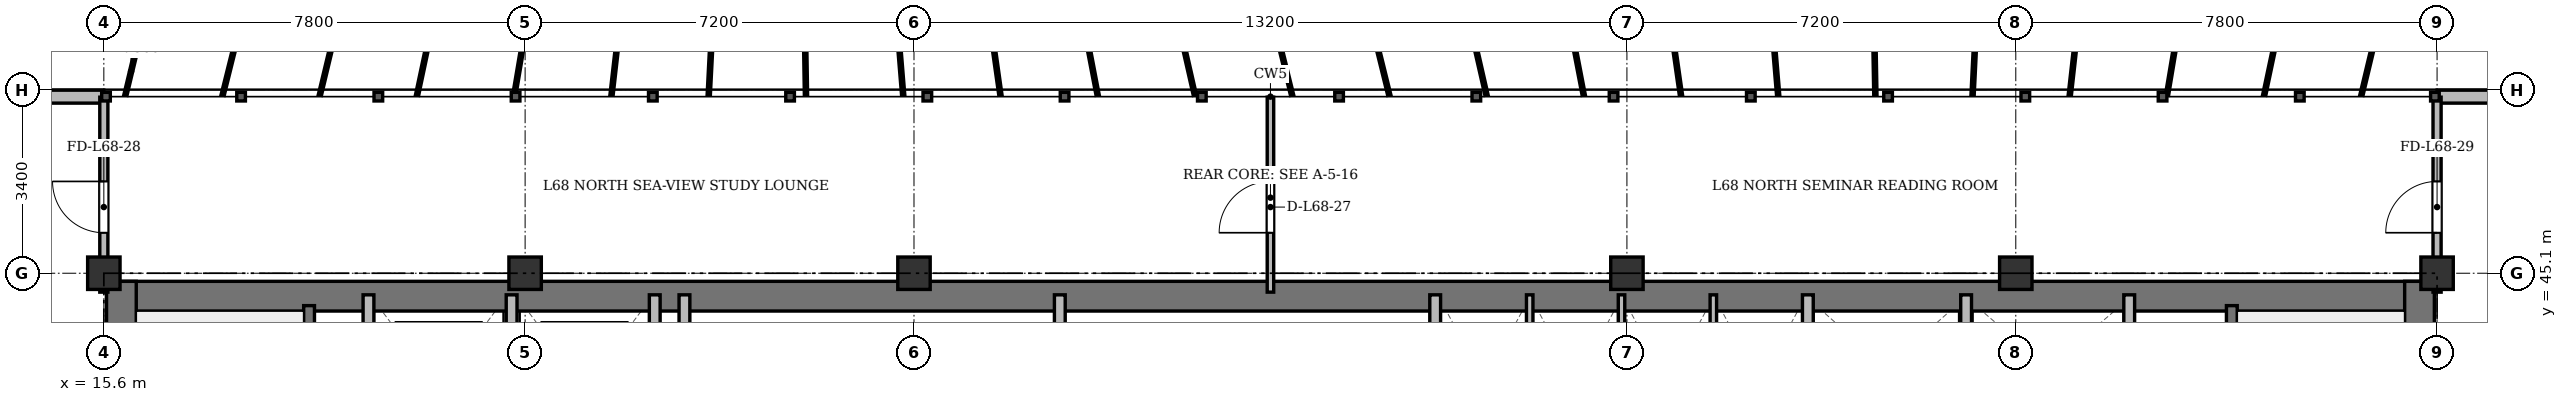
"""IFC4 building model, lengths in metres.
Left out: names, types, materials, properties, quantities, classifications, styles, units other than length and angle.
Written with IfcOpenShell. Run it as: python <this file> out.ifc"""

import sys

from ifc_helpers import new_model, si_unit, direction, frame, frame_2d, origin, origin_2d, place, context, subcontext, project, spatial, rectangle, extrude, source, transform, mapped, element, fill, save


model = new_model("IFC4")
c1 = context("Model", 3, precision=1e-05, world=origin(), true_north=direction((0.0, 1.0)))
c2 = subcontext(c1, "Body", "Model", "MODEL_VIEW")
j1 = project(units=[si_unit("LENGTHUNIT", "METRE"), si_unit("PLANEANGLEUNIT", "RADIAN")], contexts=[c1])
p1 = place(None, origin())
s1 = spatial("IfcSite", under=j1, at=p1, CompositionType="ELEMENT")
p2 = place(p1, origin())
s2 = spatial("IfcBuilding", under=s1, at=p2, CompositionType="ELEMENT")
p3 = place(p2, frame((0.0, 0.0, 263.1)))
s3 = spatial("IfcBuildingStorey", under=s2, at=p3, CompositionType="ELEMENT", Elevation=263.1)
m1 = source(origin(), c2, "Body", "SweptSolid", [
    extrude(rectangle(XDim=0.6, YDim=0.6, at=origin_2d()), origin(), (0.0, 0.0, 1.0), 3.6),
])
for number, where, z_axis, x_axis in (
    (1, (15.6, 45.1, 0.0), (0.0, 0.0, 1.0), (1.0, 0.0, 0.0)),
    (2, (23.4, 45.1, 0.0), (0.0, 0.0, 1.0), (1.0, 0.0, 0.0)),
    (3, (30.6, 45.1, 0.0), (0.0, 0.0, 1.0), (1.0, 0.0, 0.0)),
    (4, (43.8, 45.1, 0.0), (0.0, 0.0, 1.0), (1.0, 0.0, 0.0)),
    (5, (51.0, 45.1, 0.0), (0.0, 0.0, 1.0), (1.0, 0.0, 0.0)),
    (6, (58.8, 45.1, 0.0), (0.0, 0.0, 1.0), (1.0, 0.0, 0.0)),
):
    element("IfcColumn", number, at=place(p3, frame(where, z_axis=z_axis, x_axis=x_axis)), inside=s3, PredefinedType="COLUMN", context=c2, shape_type="MappedRepresentation", body=[
        mapped(m1, transform((0.0, 0.0, 0.0), x_axis=(1.0, 0.0, 0.0), y_axis=(0.0, 1.0, 0.0), z_axis=(0.0, 0.0, 1.0), scale=1.0)),
    ])
p4 = place(p3, frame((11.3, 48.37, 0.0), z_axis=(0.0, 0.0, 1.0), x_axis=(1.0, 0.0, 0.0)))
e7 = element("IfcWall", 7, at=p4, inside=s3, PredefinedType="SOLIDWALL", context=c2, shape_type="SweptSolid", body=[
    extrude(rectangle(XDim=4.3, YDim=0.24, at=frame_2d((2.15, 0.0))), origin(), (0.0, 0.0, 1.0), 3.37),
])
p5 = place(p4, frame((1.734, 0.0, 0.9)))
e8 = element("IfcOpeningElement", 8, at=p5, cuts=e7, PredefinedType="OPENING", context=c2, shape_type="SweptSolid", body=[
    extrude(rectangle(XDim=1.2, YDim=1.65, at=frame_2d((0.6, 0.825))), frame((0.0, 0.13, 0.0), z_axis=(0.0, -1.0, 0.0), x_axis=(1.0, 0.0, 0.0)), (0.0, 0.0, 1.0), 0.26),
])
p6 = place(p3, frame((58.8, 48.37, 0.0), z_axis=(0.0, 0.0, 1.0), x_axis=(1.0, 0.0, 0.0)))
e9 = element("IfcWall", 9, at=p6, inside=s3, PredefinedType="SOLIDWALL", context=c2, shape_type="SweptSolid", body=[
    extrude(rectangle(XDim=4.3, YDim=0.24, at=frame_2d((2.15, 0.0))), origin(), (0.0, 0.0, 1.0), 3.37),
])
p7 = place(p6, frame((1.46, 0.0, 0.9)))
e10 = element("IfcOpeningElement", 10, at=p7, cuts=e9, PredefinedType="OPENING", context=c2, shape_type="SweptSolid", body=[
    extrude(rectangle(XDim=1.2, YDim=1.65, at=frame_2d((0.6, 0.825))), frame((0.0, 0.13, 0.0), z_axis=(0.0, -1.0, 0.0), x_axis=(1.0, 0.0, 0.0)), (0.0, 0.0, 1.0), 0.26),
])
p8 = place(p3, frame((15.65, 44.675, 0.0), z_axis=(0.0, 0.0, 1.0), x_axis=(1.0, 0.0, 0.0)))
e11 = element("IfcWall", 11, at=p8, inside=s3, PredefinedType="SHEAR", context=c2, shape_type="SweptSolid", body=[
    extrude(rectangle(XDim=43.1, YDim=0.55, at=frame_2d((21.55, 0.0))), origin(), (0.0, 0.0, 1.0), 3.37),
])
for number, where, z_axis, x_axis in (
    (12, (15.925, 33.4, 0.0), (0.0, 0.0, 1.0), (0.0, 1.0, 0.0)),
    (13, (58.475, 33.4, 0.0), (0.0, 0.0, 1.0), (0.0, 1.0, 0.0)),
):
    element("IfcWall", number, at=place(p3, frame(where, z_axis=z_axis, x_axis=x_axis)), inside=s3, PredefinedType="SHEAR", context=c2, shape_type="SweptSolid", body=[
        extrude(rectangle(XDim=11.55, YDim=0.55, at=frame_2d((5.775, 0.0))), origin(), (0.0, 0.0, 1.0), 3.37),
    ])
p9 = place(p3, frame((19.4, 33.4, 0.0), z_axis=(0.0, 0.0, 1.0), x_axis=(0.0, 1.0, 0.0)))
e14 = element("IfcWall", 14, at=p9, inside=s3, PredefinedType="SHEAR", context=c2, shape_type="SweptSolid", body=[
    extrude(rectangle(XDim=11.1, YDim=0.2, at=frame_2d((5.55, 0.0))), origin(), (0.0, 0.0, 1.0), 3.37),
])
p10 = place(p9, frame((0.85, 0.0, 0.0)))
e15 = element("IfcOpeningElement", 15, at=p10, cuts=e14, PredefinedType="OPENING", context=c2, shape_type="SweptSolid", body=[
    extrude(rectangle(XDim=1.1, YDim=2.15, at=frame_2d((0.55, 1.075))), frame((0.0, 0.11, 0.0), z_axis=(0.0, -1.0, 0.0), x_axis=(1.0, 0.0, 0.0)), (0.0, 0.0, 1.0), 0.22),
])
p11 = place(p3, frame((55.0, 33.4, 0.0), z_axis=(0.0, 0.0, 1.0), x_axis=(0.0, 1.0, 0.0)))
e16 = element("IfcWall", 16, at=p11, inside=s3, PredefinedType="SHEAR", context=c2, shape_type="SweptSolid", body=[
    extrude(rectangle(XDim=11.1, YDim=0.2, at=frame_2d((5.55, 0.0))), origin(), (0.0, 0.0, 1.0), 3.37),
])
p12 = place(p11, frame((0.85, 0.0, 0.0)))
e17 = element("IfcOpeningElement", 17, at=p12, cuts=e16, PredefinedType="OPENING", context=c2, shape_type="SweptSolid", body=[
    extrude(rectangle(XDim=1.1, YDim=2.15, at=frame_2d((0.55, 1.075))), frame((0.0, 0.11, 0.0), z_axis=(0.0, -1.0, 0.0), x_axis=(1.0, 0.0, 0.0)), (0.0, 0.0, 1.0), 0.22),
])
for number, where, z_axis, x_axis in (
    (18, (20.5, 41.3, 0.0), (0.0, 0.0, 1.0), (0.0, 1.0, 0.0)),
    (19, (23.15, 41.3, 0.0), (0.0, 0.0, 1.0), (0.0, 1.0, 0.0)),
    (20, (25.8, 41.3, 0.0), (0.0, 0.0, 1.0), (0.0, 1.0, 0.0)),
):
    element("IfcWall", number, at=place(p3, frame(where, z_axis=z_axis, x_axis=x_axis)), inside=s3, PredefinedType="SOLIDWALL", context=c2, shape_type="SweptSolid", body=[
        extrude(rectangle(XDim=3.4, YDim=0.2, at=frame_2d((1.7, 0.0))), origin(), (0.0, 0.0, 1.0), 3.37),
    ])
for number, where, z_axis, x_axis in (
    (21, (26.35, 33.4, 0.0), (0.0, 0.0, 1.0), (0.0, 1.0, 0.0)),
    (22, (33.3, 33.4, 0.0), (0.0, 0.0, 1.0), (0.0, 1.0, 0.0)),
):
    element("IfcWall", number, at=place(p3, frame(where, z_axis=z_axis, x_axis=x_axis)), inside=s3, PredefinedType="SOLIDWALL", context=c2, shape_type="SweptSolid", body=[
        extrude(rectangle(XDim=11.3, YDim=0.2, at=frame_2d((5.65, 0.0))), origin(), (0.0, 0.0, 1.0), 2.92),
    ])
p13 = place(p3, frame((40.25, 41.5, 0.0), z_axis=(0.0, 0.0, 1.0), x_axis=(0.0, 1.0, 0.0)))
e23 = element("IfcWall", 23, at=p13, inside=s3, PredefinedType="SOLIDWALL", context=c2, shape_type="SweptSolid", body=[
    extrude(rectangle(XDim=3.2, YDim=0.2, at=frame_2d((1.6, 0.0))), origin(), (0.0, 0.0, 1.0), 3.37),
])
for number, where, z_axis, x_axis in (
    (24, (42.0, 41.5, 0.0), (0.0, 0.0, 1.0), (0.0, 1.0, 0.0)),
    (25, (43.7, 41.5, 0.0), (0.0, 0.0, 1.0), (0.0, 1.0, 0.0)),
    (26, (45.4, 41.5, 0.0), (0.0, 0.0, 1.0), (0.0, 1.0, 0.0)),
):
    element("IfcWall", number, at=place(p3, frame(where, z_axis=z_axis, x_axis=x_axis)), inside=s3, PredefinedType="PARTITIONING", context=c2, shape_type="SweptSolid", body=[
        extrude(rectangle(XDim=3.2, YDim=0.12, at=frame_2d((1.6, 0.0))), origin(), (0.0, 0.0, 1.0), 3.37),
    ])
p14 = place(p3, frame((47.15, 33.4, 0.0), z_axis=(0.0, 0.0, 1.0), x_axis=(0.0, 1.0, 0.0)))
e27 = element("IfcWall", 27, at=p14, inside=s3, PredefinedType="SOLIDWALL", context=c2, shape_type="SweptSolid", body=[
    extrude(rectangle(XDim=11.3, YDim=0.2, at=frame_2d((5.65, 0.0))), origin(), (0.0, 0.0, 1.0), 2.92),
])
for number, where, z_axis, x_axis in (
    (28, (50.08, 42.05, 0.0), (0.0, 0.0, 1.0), (0.0, 1.0, 0.0)),
    (29, (53.1, 42.05, 0.0), (0.0, 0.0, 1.0), (0.0, 1.0, 0.0)),
):
    element("IfcWall", number, at=place(p3, frame(where, z_axis=z_axis, x_axis=x_axis)), inside=s3, PredefinedType="SOLIDWALL", context=c2, shape_type="SweptSolid", body=[
        extrude(rectangle(XDim=2.65, YDim=0.2, at=frame_2d((1.325, 0.0))), origin(), (0.0, 0.0, 1.0), 3.37),
    ])
p15 = place(p3, frame((37.2, 44.75, 0.0), z_axis=(0.0, 0.0, 1.0), x_axis=(0.0, 1.0, 0.0)))
e30 = element("IfcWall", 30, at=p15, inside=s3, PredefinedType="PARTITIONING", context=c2, shape_type="SweptSolid", body=[
    extrude(rectangle(XDim=3.61, YDim=0.12, at=frame_2d((1.805, 0.0))), origin(), (0.0, 0.0, 1.0), 2.92),
])
p16 = place(p15, frame((1.1, 0.0, 0.0)))
e31 = element("IfcOpeningElement", 31, at=p16, cuts=e30, PredefinedType="OPENING", context=c2, shape_type="SweptSolid", body=[
    extrude(rectangle(XDim=0.95, YDim=2.15, at=frame_2d((0.475, 1.075))), frame((0.0, 0.07, 0.0), z_axis=(0.0, -1.0, 0.0), x_axis=(1.0, 0.0, 0.0)), (0.0, 0.0, 1.0), 0.14),
])
p17 = place(p3, frame((15.6, 44.75, 0.0), z_axis=(0.0, 0.0, 1.0), x_axis=(0.0, 1.0, 0.0)))
e32 = element("IfcWall", 32, at=p17, inside=s3, PredefinedType="PARTITIONING", context=c2, shape_type="SweptSolid", body=[
    extrude(rectangle(XDim=3.61, YDim=0.15, at=frame_2d((1.805, 0.0))), origin(), (0.0, 0.0, 1.0), 2.87),
])
p18 = place(p17, frame((1.1, 0.0, 0.0)))
e33 = element("IfcOpeningElement", 33, at=p18, cuts=e32, PredefinedType="OPENING", context=c2, shape_type="SweptSolid", body=[
    extrude(rectangle(XDim=0.95, YDim=2.15, at=frame_2d((0.475, 1.075))), frame((0.0, 0.085, 0.0), z_axis=(0.0, -1.0, 0.0), x_axis=(1.0, 0.0, 0.0)), (0.0, 0.0, 1.0), 0.17),
])
p19 = place(p3, frame((58.8, 44.75, 0.0), z_axis=(0.0, 0.0, 1.0), x_axis=(0.0, 1.0, 0.0)))
e34 = element("IfcWall", 34, at=p19, inside=s3, PredefinedType="PARTITIONING", context=c2, shape_type="SweptSolid", body=[
    extrude(rectangle(XDim=3.61, YDim=0.15, at=frame_2d((1.805, 0.0))), origin(), (0.0, 0.0, 1.0), 2.87),
])
p20 = place(p19, frame((1.1, 0.0, 0.0)))
e35 = element("IfcOpeningElement", 35, at=p20, cuts=e34, PredefinedType="OPENING", context=c2, shape_type="SweptSolid", body=[
    extrude(rectangle(XDim=0.95, YDim=2.15, at=frame_2d((0.475, 1.075))), frame((0.0, 0.085, 0.0), z_axis=(0.0, -1.0, 0.0), x_axis=(1.0, 0.0, 0.0)), (0.0, 0.0, 1.0), 0.17),
])
m2 = source(origin(), c2, "Body", "SweptSolid", [
    extrude(rectangle(XDim=0.95, YDim=2.15, at=frame_2d((0.475, 1.075))), frame((0.0, 0.025, 0.0), z_axis=(0.0, -1.0, 0.0), x_axis=(1.0, 0.0, 0.0)), (0.0, 0.0, 1.0), 0.05),
])
p21 = place(p16, origin())
e36 = element("IfcDoor", 36, at=p21, inside=s3, OperationType="SINGLE_SWING_LEFT", PredefinedType="DOOR", context=c2, shape_type="MappedRepresentation", body=[
    mapped(m2, transform((0.0, 0.0, 0.0), x_axis=(1.0, 0.0, 0.0), y_axis=(0.0, 1.0, 0.0), z_axis=(0.0, 0.0, 1.0), scale=1.0)),
])
fill(e31, e36)
p22 = place(p18, origin())
e37 = element("IfcDoor", 37, at=p22, inside=s3, OperationType="SINGLE_SWING_RIGHT", PredefinedType="DOOR", context=c2, shape_type="MappedRepresentation", body=[
    mapped(m2, transform((0.0, 0.0, 0.0), x_axis=(1.0, 0.0, 0.0), y_axis=(0.0, 1.0, 0.0), z_axis=(0.0, 0.0, 1.0), scale=1.0)),
])
fill(e33, e37)
p23 = place(p20, origin())
e38 = element("IfcDoor", 38, at=p23, inside=s3, OperationType="SINGLE_SWING_LEFT", PredefinedType="DOOR", context=c2, shape_type="MappedRepresentation", body=[
    mapped(m2, transform((0.0, 0.0, 0.0), x_axis=(1.0, 0.0, 0.0), y_axis=(0.0, 1.0, 0.0), z_axis=(0.0, 0.0, 1.0), scale=1.0)),
])
fill(e35, e38)
save(model, sys.argv[1])
